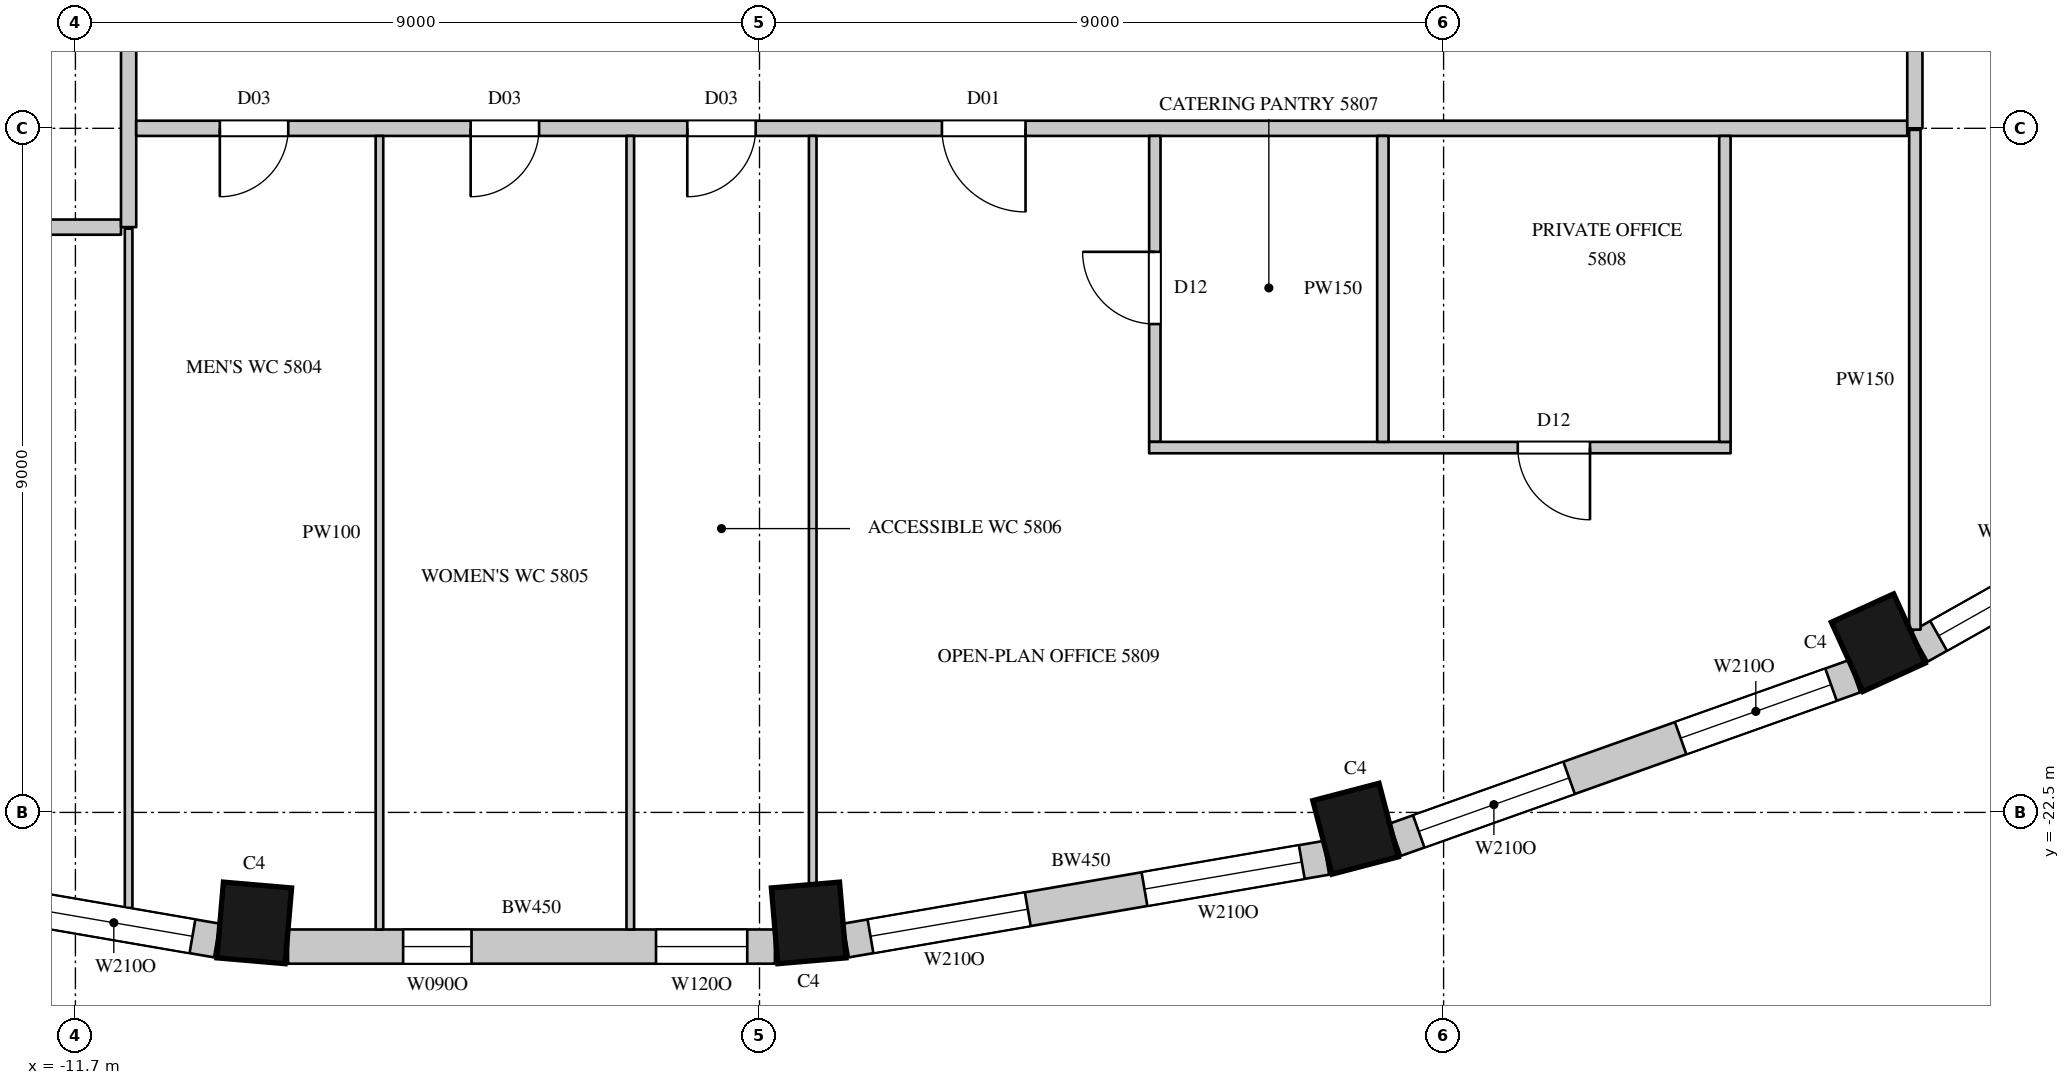
"""IFC4 building model, lengths in metres.
Left out: names, types, materials, properties, quantities, classifications, styles, units other than length and angle.
Written with IfcOpenShell. Run it as: python <this file> out.ifc"""

import sys

from ifc_helpers import new_model, si_unit, direction, frame, frame_2d, origin, origin_2d, place, context, subcontext, project, spatial, rectangle, extrude, element, fill, save


model = new_model("IFC4")
c1 = context("Model", 3, precision=1e-05, world=origin(), true_north=direction((0.0, 1.0)))
c2 = subcontext(c1, "Body", "Model", "MODEL_VIEW")
j1 = project(units=[si_unit("LENGTHUNIT", "METRE"), si_unit("PLANEANGLEUNIT", "RADIAN")], contexts=[c1])
p1 = place(None, origin())
s1 = spatial("IfcSite", under=j1, at=p1, CompositionType="ELEMENT")
p2 = place(p1, origin())
s2 = spatial("IfcBuilding", under=s1, at=p2, CompositionType="ELEMENT")
p3 = place(p2, frame((0.0, 0.0, 259.8)))
s3 = spatial("IfcBuildingStorey", under=s2, at=p3, CompositionType="ELEMENT", Elevation=259.8)
for number, where, z_axis, x_axis in (
    (1, (-9.347, -23.954, 0.0), (0.0, 0.0, 1.0), (0.996, -0.085, 0.0)),
    (2, (-2.053, -23.954, 0.0), (0.0, 0.0, 1.0), (0.996, 0.085, 0.0)),
    (3, (5.142, -22.715, 0.0), (0.0, 0.0, 1.0), (0.967, 0.253, 0.0)),
    (4, (12.019, -20.267, 0.0), (0.0, 0.0, 1.0), (0.91, 0.415, 0.0)),
):
    element("IfcColumn", number, at=place(p3, frame(where, z_axis=z_axis, x_axis=x_axis)), inside=s3, PredefinedType="COLUMN", context=c2, shape_type="SweptSolid", body=[
        extrude(rectangle(XDim=0.9, YDim=1.0, at=origin_2d()), origin(), (0.0, 0.0, 1.0), 4.1),
    ])
p4 = place(p3, frame((-16.157, -23.097, 0.0), z_axis=(0.0, 0.0, 1.0), x_axis=(0.985502073964, -0.169663379113, 0.0)))
e5 = element("IfcWall", 5, at=p4, inside=s3, PredefinedType="SOLIDWALL", context=c2, shape_type="SweptSolid", body=[
    extrude(rectangle(XDim=6.412, YDim=0.45, at=frame_2d((3.206, 0.0))), origin(), (0.0, 0.0, 1.0), 3.8),
])
p5 = place(p4, frame((0.327, 0.0, 1.05)))
e6 = element("IfcOpeningElement", 6, at=p5, cuts=e5, PredefinedType="OPENING", context=c2, shape_type="SweptSolid", body=[
    extrude(rectangle(XDim=2.1, YDim=2.4, at=frame_2d((1.05, 1.2))), frame((0.0, 0.235, 0.0), z_axis=(0.0, -1.0, 0.0), x_axis=(1.0, 0.0, 0.0)), (0.0, 0.0, 1.0), 0.47),
])
p6 = place(p4, frame((3.985, 0.0, 1.05)))
e7 = element("IfcOpeningElement", 7, at=p6, cuts=e5, PredefinedType="OPENING", context=c2, shape_type="SweptSolid", body=[
    extrude(rectangle(XDim=2.1, YDim=2.4, at=frame_2d((1.05, 1.2))), frame((0.0, 0.235, 0.0), z_axis=(0.0, -1.0, 0.0), x_axis=(1.0, 0.0, 0.0)), (0.0, 0.0, 1.0), 0.47),
])
p7 = place(p3, frame((-8.903, -24.265, 0.0), z_axis=(0.0, 0.0, 1.0), x_axis=(1.0, 0.0, 0.0)))
e8 = element("IfcWall", 8, at=p7, inside=s3, PredefinedType="SOLIDWALL", context=c2, shape_type="SweptSolid", body=[
    extrude(rectangle(XDim=6.406, YDim=0.45, at=frame_2d((3.203, 0.0))), origin(), (0.0, 0.0, 1.0), 3.8),
])
p8 = place(p7, frame((1.514, 0.0, 1.05)))
e9 = element("IfcOpeningElement", 9, at=p8, cuts=e8, PredefinedType="OPENING", context=c2, shape_type="SweptSolid", body=[
    extrude(rectangle(XDim=0.9, YDim=2.4, at=frame_2d((0.45, 1.2))), frame((0.0, 0.235, 0.0), z_axis=(0.0, -1.0, 0.0), x_axis=(1.0, 0.0, 0.0)), (0.0, 0.0, 1.0), 0.47),
])
p9 = place(p7, frame((4.841, 0.0, 1.05)))
e10 = element("IfcOpeningElement", 10, at=p9, cuts=e8, PredefinedType="OPENING", context=c2, shape_type="SweptSolid", body=[
    extrude(rectangle(XDim=1.2, YDim=2.4, at=frame_2d((0.6, 1.2))), frame((0.0, 0.235, 0.0), z_axis=(0.0, -1.0, 0.0), x_axis=(1.0, 0.0, 0.0)), (0.0, 0.0, 1.0), 0.47),
])
p10 = place(p3, frame((-1.562, -24.185, 0.0), z_axis=(0.0, 0.0, 1.0), x_axis=(0.985502073964, 0.169663379113, 0.0)))
e11 = element("IfcWall", 11, at=p10, inside=s3, PredefinedType="SOLIDWALL", context=c2, shape_type="SweptSolid", body=[
    extrude(rectangle(XDim=6.412, YDim=0.45, at=frame_2d((3.206, 0.0))), origin(), (0.0, 0.0, 1.0), 3.8),
])
p11 = place(p10, frame((0.327, 0.0, 1.05)))
e12 = element("IfcOpeningElement", 12, at=p11, cuts=e11, PredefinedType="OPENING", context=c2, shape_type="SweptSolid", body=[
    extrude(rectangle(XDim=2.1, YDim=2.4, at=frame_2d((1.05, 1.2))), frame((0.0, 0.235, 0.0), z_axis=(0.0, -1.0, 0.0), x_axis=(1.0, 0.0, 0.0)), (0.0, 0.0, 1.0), 0.47),
])
p12 = place(p10, frame((3.985, 0.0, 1.05)))
e13 = element("IfcOpeningElement", 13, at=p12, cuts=e11, PredefinedType="OPENING", context=c2, shape_type="SweptSolid", body=[
    extrude(rectangle(XDim=2.1, YDim=2.4, at=frame_2d((1.05, 1.2))), frame((0.0, 0.235, 0.0), z_axis=(0.0, -1.0, 0.0), x_axis=(1.0, 0.0, 0.0)), (0.0, 0.0, 1.0), 0.47),
])
p13 = place(p3, frame((5.665, -22.859, 0.0), z_axis=(0.0, 0.0, 1.0), x_axis=(0.942108340262, 0.335308626803, 0.0)))
e14 = element("IfcWall", 14, at=p13, inside=s3, PredefinedType="SOLIDWALL", context=c2, shape_type="SweptSolid", body=[
    extrude(rectangle(XDim=6.412, YDim=0.45, at=frame_2d((3.206, 0.0))), origin(), (0.0, 0.0, 1.0), 3.8),
])
p14 = place(p13, frame((0.327, 0.0, 1.05)))
e15 = element("IfcOpeningElement", 15, at=p14, cuts=e14, PredefinedType="OPENING", context=c2, shape_type="SweptSolid", body=[
    extrude(rectangle(XDim=2.1, YDim=2.4, at=frame_2d((1.05, 1.2))), frame((0.0, 0.235, 0.0), z_axis=(0.0, -1.0, 0.0), x_axis=(1.0, 0.0, 0.0)), (0.0, 0.0, 1.0), 0.47),
])
p15 = place(p13, frame((3.985, 0.0, 1.05)))
e16 = element("IfcOpeningElement", 16, at=p15, cuts=e14, PredefinedType="OPENING", context=c2, shape_type="SweptSolid", body=[
    extrude(rectangle(XDim=2.1, YDim=2.4, at=frame_2d((1.05, 1.2))), frame((0.0, 0.235, 0.0), z_axis=(0.0, -1.0, 0.0), x_axis=(1.0, 0.0, 0.0)), (0.0, 0.0, 1.0), 0.47),
])
p16 = place(p3, frame((12.559, -20.32, 0.0), z_axis=(0.0, 0.0, 1.0), x_axis=(0.871065783524, 0.491166367714, 0.0)))
e17 = element("IfcWall", 17, at=p16, inside=s3, PredefinedType="SOLIDWALL", context=c2, shape_type="SweptSolid", body=[
    extrude(rectangle(XDim=6.196, YDim=0.45, at=frame_2d((3.098, 0.0))), origin(), (0.0, 0.0, 1.0), 3.8),
])
p17 = place(p16, frame((0.291, 0.0, 1.05)))
e18 = element("IfcOpeningElement", 18, at=p17, cuts=e17, PredefinedType="OPENING", context=c2, shape_type="SweptSolid", body=[
    extrude(rectangle(XDim=2.1, YDim=2.4, at=frame_2d((1.05, 1.2))), frame((0.0, 0.235, 0.0), z_axis=(0.0, -1.0, 0.0), x_axis=(1.0, 0.0, 0.0)), (0.0, 0.0, 1.0), 0.47),
])
p18 = place(p16, frame((3.875, 0.0, 1.05)))
e19 = element("IfcOpeningElement", 19, at=p18, cuts=e17, PredefinedType="OPENING", context=c2, shape_type="SweptSolid", body=[
    extrude(rectangle(XDim=2.1, YDim=2.4, at=frame_2d((1.05, 1.2))), frame((0.0, 0.235, 0.0), z_axis=(0.0, -1.0, 0.0), x_axis=(1.0, 0.0, 0.0)), (0.0, 0.0, 1.0), 0.47),
])
p19 = place(p3, frame((-13.97, -14.8, 0.0), z_axis=(0.0, 0.0, 1.0), x_axis=(1.0, 0.0, 0.0)))
e20 = element("IfcWall", 20, at=p19, inside=s3, PredefinedType="PARTITIONING", context=c2, shape_type="SweptSolid", body=[
    extrude(rectangle(XDim=2.87, YDim=0.2, at=frame_2d((1.435, 0.0))), origin(), (0.0, 0.0, 1.0), 3.8),
])
p20 = place(p3, frame((-11.0, -14.8, 0.0), z_axis=(0.0, 0.0, 1.0), x_axis=(0.0, 1.0, 0.0)))
e21 = element("IfcWall", 21, at=p20, inside=s3, PredefinedType="PARTITIONING", context=c2, shape_type="SweptSolid", body=[
    extrude(rectangle(XDim=29.5, YDim=0.2, at=frame_2d((14.75, 0.0))), origin(), (0.0, 0.0, 1.0), 3.8),
])
p21 = place(p20, frame((14.05, 0.0, 0.0)))
e22 = element("IfcOpeningElement", 22, at=p21, cuts=e21, PredefinedType="OPENING", context=c2, shape_type="SweptSolid", body=[
    extrude(rectangle(XDim=1.5, YDim=2.4, at=frame_2d((0.75, 1.2))), frame((0.0, 0.11, 0.0), z_axis=(0.0, -1.0, 0.0), x_axis=(1.0, 0.0, 0.0)), (0.0, 0.0, 1.0), 0.22),
])
p22 = place(p3, frame((-10.9, -13.5, 0.0), z_axis=(0.0, 0.0, 1.0), x_axis=(1.0, 0.0, 0.0)))
e23 = element("IfcWall", 23, at=p22, inside=s3, PredefinedType="PARTITIONING", context=c2, shape_type="SweptSolid", body=[
    extrude(rectangle(XDim=23.3, YDim=0.2, at=frame_2d((11.65, 0.0))), origin(), (0.0, 0.0, 1.0), 3.8),
])
p23 = place(p22, frame((1.1, 0.0, 0.0)))
e24 = element("IfcOpeningElement", 24, at=p23, cuts=e23, PredefinedType="OPENING", context=c2, shape_type="SweptSolid", body=[
    extrude(rectangle(XDim=0.9, YDim=2.2, at=frame_2d((0.45, 1.1))), frame((0.0, 0.11, 0.0), z_axis=(0.0, -1.0, 0.0), x_axis=(1.0, 0.0, 0.0)), (0.0, 0.0, 1.0), 0.22),
])
p24 = place(p22, frame((4.4, 0.0, 0.0)))
e25 = element("IfcOpeningElement", 25, at=p24, cuts=e23, PredefinedType="OPENING", context=c2, shape_type="SweptSolid", body=[
    extrude(rectangle(XDim=0.9, YDim=2.2, at=frame_2d((0.45, 1.1))), frame((0.0, 0.11, 0.0), z_axis=(0.0, -1.0, 0.0), x_axis=(1.0, 0.0, 0.0)), (0.0, 0.0, 1.0), 0.22),
])
p25 = place(p22, frame((7.25, 0.0, 0.0)))
e26 = element("IfcOpeningElement", 26, at=p25, cuts=e23, PredefinedType="OPENING", context=c2, shape_type="SweptSolid", body=[
    extrude(rectangle(XDim=0.9, YDim=2.2, at=frame_2d((0.45, 1.1))), frame((0.0, 0.11, 0.0), z_axis=(0.0, -1.0, 0.0), x_axis=(1.0, 0.0, 0.0)), (0.0, 0.0, 1.0), 0.22),
])
p26 = place(p22, frame((10.6, 0.0, 0.0)))
e27 = element("IfcOpeningElement", 27, at=p26, cuts=e23, PredefinedType="OPENING", context=c2, shape_type="SweptSolid", body=[
    extrude(rectangle(XDim=1.1, YDim=2.4, at=frame_2d((0.55, 1.2))), frame((0.0, 0.11, 0.0), z_axis=(0.0, -1.0, 0.0), x_axis=(1.0, 0.0, 0.0)), (0.0, 0.0, 1.0), 0.22),
])
p27 = place(p3, frame((12.5, -13.5, 0.0), z_axis=(0.0, 0.0, 1.0), x_axis=(0.0, 1.0, 0.0)))
e28 = element("IfcWall", 28, at=p27, inside=s3, PredefinedType="PARTITIONING", context=c2, shape_type="SweptSolid", body=[
    extrude(rectangle(XDim=26.9, YDim=0.2, at=frame_2d((13.45, 0.0))), origin(), (0.0, 0.0, 1.0), 3.8),
])
p28 = place(p27, frame((12.75, 0.0, 0.0)))
e29 = element("IfcOpeningElement", 29, at=p28, cuts=e28, PredefinedType="OPENING", context=c2, shape_type="SweptSolid", body=[
    extrude(rectangle(XDim=1.5, YDim=2.4, at=frame_2d((0.75, 1.2))), frame((0.0, 0.11, 0.0), z_axis=(0.0, -1.0, 0.0), x_axis=(1.0, 0.0, 0.0)), (0.0, 0.0, 1.0), 0.22),
])
p29 = place(p3, frame((2.501, -17.625, 0.0), z_axis=(0.0, 0.0, 1.0), x_axis=(0.0, 1.0, 0.0)))
e30 = element("IfcWall", 30, at=p29, inside=s3, PredefinedType="PARTITIONING", context=c2, shape_type="SweptSolid", body=[
    extrude(rectangle(XDim=4.025, YDim=0.15, at=frame_2d((2.012, 0.0))), origin(), (0.0, 0.0, 1.0), 3.8),
])
p30 = place(p29, frame((1.55, 0.0, 0.0)))
e31 = element("IfcOpeningElement", 31, at=p30, cuts=e30, PredefinedType="OPENING", context=c2, shape_type="SweptSolid", body=[
    extrude(rectangle(XDim=0.95, YDim=2.2, at=frame_2d((0.475, 1.1))), frame((0.0, 0.085, 0.0), z_axis=(0.0, -1.0, 0.0), x_axis=(1.0, 0.0, 0.0)), (0.0, 0.0, 1.0), 0.17),
])
p31 = place(p3, frame((2.426, -17.7, 0.0), z_axis=(0.0, 0.0, 1.0), x_axis=(1.0, 0.0, 0.0)))
e32 = element("IfcWall", 32, at=p31, inside=s3, PredefinedType="PARTITIONING", context=c2, shape_type="SweptSolid", body=[
    extrude(rectangle(XDim=7.65, YDim=0.15, at=frame_2d((3.825, 0.0))), origin(), (0.0, 0.0, 1.0), 3.8),
])
p32 = place(p31, frame((4.85, 0.0, 0.0)))
e33 = element("IfcOpeningElement", 33, at=p32, cuts=e32, PredefinedType="OPENING", context=c2, shape_type="SweptSolid", body=[
    extrude(rectangle(XDim=0.95, YDim=2.2, at=frame_2d((0.475, 1.1))), frame((0.0, 0.085, 0.0), z_axis=(0.0, -1.0, 0.0), x_axis=(1.0, 0.0, 0.0)), (0.0, 0.0, 1.0), 0.17),
])
for number, where, z_axis, x_axis in (
    (34, (5.501, -17.625, 0.0), (0.0, 0.0, 1.0), (0.0, 1.0, 0.0)),
    (35, (10.001, -17.625, 0.0), (0.0, 0.0, 1.0), (0.0, 1.0, 0.0)),
):
    element("IfcWall", number, at=place(p3, frame(where, z_axis=z_axis, x_axis=x_axis)), inside=s3, PredefinedType="PARTITIONING", context=c2, shape_type="SweptSolid", body=[
        extrude(rectangle(XDim=4.025, YDim=0.15, at=frame_2d((2.012, 0.0))), origin(), (0.0, 0.0, 1.0), 3.8),
    ])
p33 = place(p3, frame((12.5, -20.095, 0.0), z_axis=(0.0, 0.0, 1.0), x_axis=(0.0, 1.0, 0.0)))
e36 = element("IfcWall", 36, at=p33, inside=s3, PredefinedType="PARTITIONING", context=c2, shape_type="SweptSolid", body=[
    extrude(rectangle(XDim=6.575, YDim=0.15, at=frame_2d((3.288, 0.0))), origin(), (0.0, 0.0, 1.0), 3.8),
])
p34 = place(p3, frame((-11.0, -23.757, 0.0), z_axis=(0.0, 0.0, 1.0), x_axis=(0.0, 1.0, 0.0)))
e37 = element("IfcWall", 37, at=p34, inside=s3, PredefinedType="PARTITIONING", context=c2, shape_type="SweptSolid", body=[
    extrude(rectangle(XDim=8.937, YDim=0.1, at=frame_2d((4.468, 0.0))), origin(), (0.0, 0.0, 1.0), 3.8),
])
for number, where, z_axis, x_axis in (
    (38, (-7.7, -24.04, 0.0), (0.0, 0.0, 1.0), (0.0, 1.0, 0.0)),
    (39, (-4.4, -24.04, 0.0), (0.0, 0.0, 1.0), (0.0, 1.0, 0.0)),
):
    element("IfcWall", number, at=place(p3, frame(where, z_axis=z_axis, x_axis=x_axis)), inside=s3, PredefinedType="PARTITIONING", context=c2, shape_type="SweptSolid", body=[
        extrude(rectangle(XDim=10.44, YDim=0.1, at=frame_2d((5.22, 0.0))), origin(), (0.0, 0.0, 1.0), 3.8),
    ])
p35 = place(p3, frame((-2.0, -23.447, 0.0), z_axis=(0.0, 0.0, 1.0), x_axis=(0.0, 1.0, 0.0)))
e40 = element("IfcWall", 40, at=p35, inside=s3, PredefinedType="PARTITIONING", context=c2, shape_type="SweptSolid", body=[
    extrude(rectangle(XDim=9.847, YDim=0.1, at=frame_2d((4.924, 0.0))), origin(), (0.0, 0.0, 1.0), 3.8),
])
p36 = place(p6, origin())
e41 = element("IfcWindow", 41, at=p36, inside=s3, PartitioningType="SINGLE_PANEL", PredefinedType="WINDOW", context=c2, shape_type="SweptSolid", body=[
    extrude(rectangle(XDim=2.1, YDim=2.4, at=frame_2d((1.05, 1.2))), frame((0.0, 0.135, 0.0), z_axis=(0.0, -1.0, 0.0), x_axis=(1.0, 0.0, 0.0)), (0.0, 0.0, 1.0), 0.06),
])
fill(e7, e41)
p37 = place(p11, origin())
e42 = element("IfcWindow", 42, at=p37, inside=s3, PartitioningType="SINGLE_PANEL", PredefinedType="WINDOW", context=c2, shape_type="SweptSolid", body=[
    extrude(rectangle(XDim=2.1, YDim=2.4, at=frame_2d((1.05, 1.2))), frame((0.0, 0.135, 0.0), z_axis=(0.0, -1.0, 0.0), x_axis=(1.0, 0.0, 0.0)), (0.0, 0.0, 1.0), 0.06),
])
fill(e12, e42)
p38 = place(p12, origin())
e43 = element("IfcWindow", 43, at=p38, inside=s3, PartitioningType="SINGLE_PANEL", PredefinedType="WINDOW", context=c2, shape_type="SweptSolid", body=[
    extrude(rectangle(XDim=2.1, YDim=2.4, at=frame_2d((1.05, 1.2))), frame((0.0, 0.135, 0.0), z_axis=(0.0, -1.0, 0.0), x_axis=(1.0, 0.0, 0.0)), (0.0, 0.0, 1.0), 0.06),
])
fill(e13, e43)
p39 = place(p14, origin())
e44 = element("IfcWindow", 44, at=p39, inside=s3, PartitioningType="SINGLE_PANEL", PredefinedType="WINDOW", context=c2, shape_type="SweptSolid", body=[
    extrude(rectangle(XDim=2.1, YDim=2.4, at=frame_2d((1.05, 1.2))), frame((0.0, 0.135, 0.0), z_axis=(0.0, -1.0, 0.0), x_axis=(1.0, 0.0, 0.0)), (0.0, 0.0, 1.0), 0.06),
])
fill(e15, e44)
p40 = place(p15, origin())
e45 = element("IfcWindow", 45, at=p40, inside=s3, PartitioningType="SINGLE_PANEL", PredefinedType="WINDOW", context=c2, shape_type="SweptSolid", body=[
    extrude(rectangle(XDim=2.1, YDim=2.4, at=frame_2d((1.05, 1.2))), frame((0.0, 0.135, 0.0), z_axis=(0.0, -1.0, 0.0), x_axis=(1.0, 0.0, 0.0)), (0.0, 0.0, 1.0), 0.06),
])
fill(e16, e45)
p41 = place(p17, origin())
e46 = element("IfcWindow", 46, at=p41, inside=s3, PartitioningType="SINGLE_PANEL", PredefinedType="WINDOW", context=c2, shape_type="SweptSolid", body=[
    extrude(rectangle(XDim=2.1, YDim=2.4, at=frame_2d((1.05, 1.2))), frame((0.0, 0.135, 0.0), z_axis=(0.0, -1.0, 0.0), x_axis=(1.0, 0.0, 0.0)), (0.0, 0.0, 1.0), 0.06),
])
fill(e18, e46)
p42 = place(p23, origin())
e47 = element("IfcDoor", 47, at=p42, inside=s3, OperationType="SINGLE_SWING_RIGHT", PredefinedType="DOOR", context=c2, shape_type="SweptSolid", body=[
    extrude(rectangle(XDim=0.9, YDim=2.2, at=frame_2d((0.45, 1.1))), frame((0.0, 0.025, 0.0), z_axis=(0.0, -1.0, 0.0), x_axis=(1.0, 0.0, 0.0)), (0.0, 0.0, 1.0), 0.05),
])
fill(e24, e47)
p43 = place(p24, origin())
e48 = element("IfcDoor", 48, at=p43, inside=s3, OperationType="SINGLE_SWING_RIGHT", PredefinedType="DOOR", context=c2, shape_type="SweptSolid", body=[
    extrude(rectangle(XDim=0.9, YDim=2.2, at=frame_2d((0.45, 1.1))), frame((0.0, 0.025, 0.0), z_axis=(0.0, -1.0, 0.0), x_axis=(1.0, 0.0, 0.0)), (0.0, 0.0, 1.0), 0.05),
])
fill(e25, e48)
p44 = place(p25, origin())
e49 = element("IfcDoor", 49, at=p44, inside=s3, OperationType="SINGLE_SWING_RIGHT", PredefinedType="DOOR", context=c2, shape_type="SweptSolid", body=[
    extrude(rectangle(XDim=0.9, YDim=2.2, at=frame_2d((0.45, 1.1))), frame((0.0, 0.025, 0.0), z_axis=(0.0, -1.0, 0.0), x_axis=(1.0, 0.0, 0.0)), (0.0, 0.0, 1.0), 0.05),
])
fill(e26, e49)
p45 = place(p26, origin())
e50 = element("IfcDoor", 50, at=p45, inside=s3, OperationType="SINGLE_SWING_LEFT", PredefinedType="DOOR", context=c2, shape_type="SweptSolid", body=[
    extrude(rectangle(XDim=1.1, YDim=2.4, at=frame_2d((0.55, 1.2))), frame((0.0, 0.025, 0.0), z_axis=(0.0, -1.0, 0.0), x_axis=(1.0, 0.0, 0.0)), (0.0, 0.0, 1.0), 0.05),
])
fill(e27, e50)
p46 = place(p30, origin())
e51 = element("IfcDoor", 51, at=p46, inside=s3, OperationType="SINGLE_SWING_RIGHT", PredefinedType="DOOR", context=c2, shape_type="SweptSolid", body=[
    extrude(rectangle(XDim=0.95, YDim=2.2, at=frame_2d((0.475, 1.1))), frame((0.0, 0.025, 0.0), z_axis=(0.0, -1.0, 0.0), x_axis=(1.0, 0.0, 0.0)), (0.0, 0.0, 1.0), 0.05),
])
fill(e31, e51)
p47 = place(p32, origin())
e52 = element("IfcDoor", 52, at=p47, inside=s3, OperationType="SINGLE_SWING_LEFT", PredefinedType="DOOR", context=c2, shape_type="SweptSolid", body=[
    extrude(rectangle(XDim=0.95, YDim=2.2, at=frame_2d((0.475, 1.1))), frame((0.0, 0.025, 0.0), z_axis=(0.0, -1.0, 0.0), x_axis=(1.0, 0.0, 0.0)), (0.0, 0.0, 1.0), 0.05),
])
fill(e33, e52)
p48 = place(p8, origin())
e53 = element("IfcWindow", 53, at=p48, inside=s3, PartitioningType="SINGLE_PANEL", PredefinedType="WINDOW", context=c2, shape_type="SweptSolid", body=[
    extrude(rectangle(XDim=0.9, YDim=2.4, at=frame_2d((0.45, 1.2))), frame((0.0, 0.135, 0.0), z_axis=(0.0, -1.0, 0.0), x_axis=(1.0, 0.0, 0.0)), (0.0, 0.0, 1.0), 0.06),
])
fill(e9, e53)
p49 = place(p9, origin())
e54 = element("IfcWindow", 54, at=p49, inside=s3, PartitioningType="SINGLE_PANEL", PredefinedType="WINDOW", context=c2, shape_type="SweptSolid", body=[
    extrude(rectangle(XDim=1.2, YDim=2.4, at=frame_2d((0.6, 1.2))), frame((0.0, 0.135, 0.0), z_axis=(0.0, -1.0, 0.0), x_axis=(1.0, 0.0, 0.0)), (0.0, 0.0, 1.0), 0.06),
])
fill(e10, e54)
save(model, sys.argv[1])
